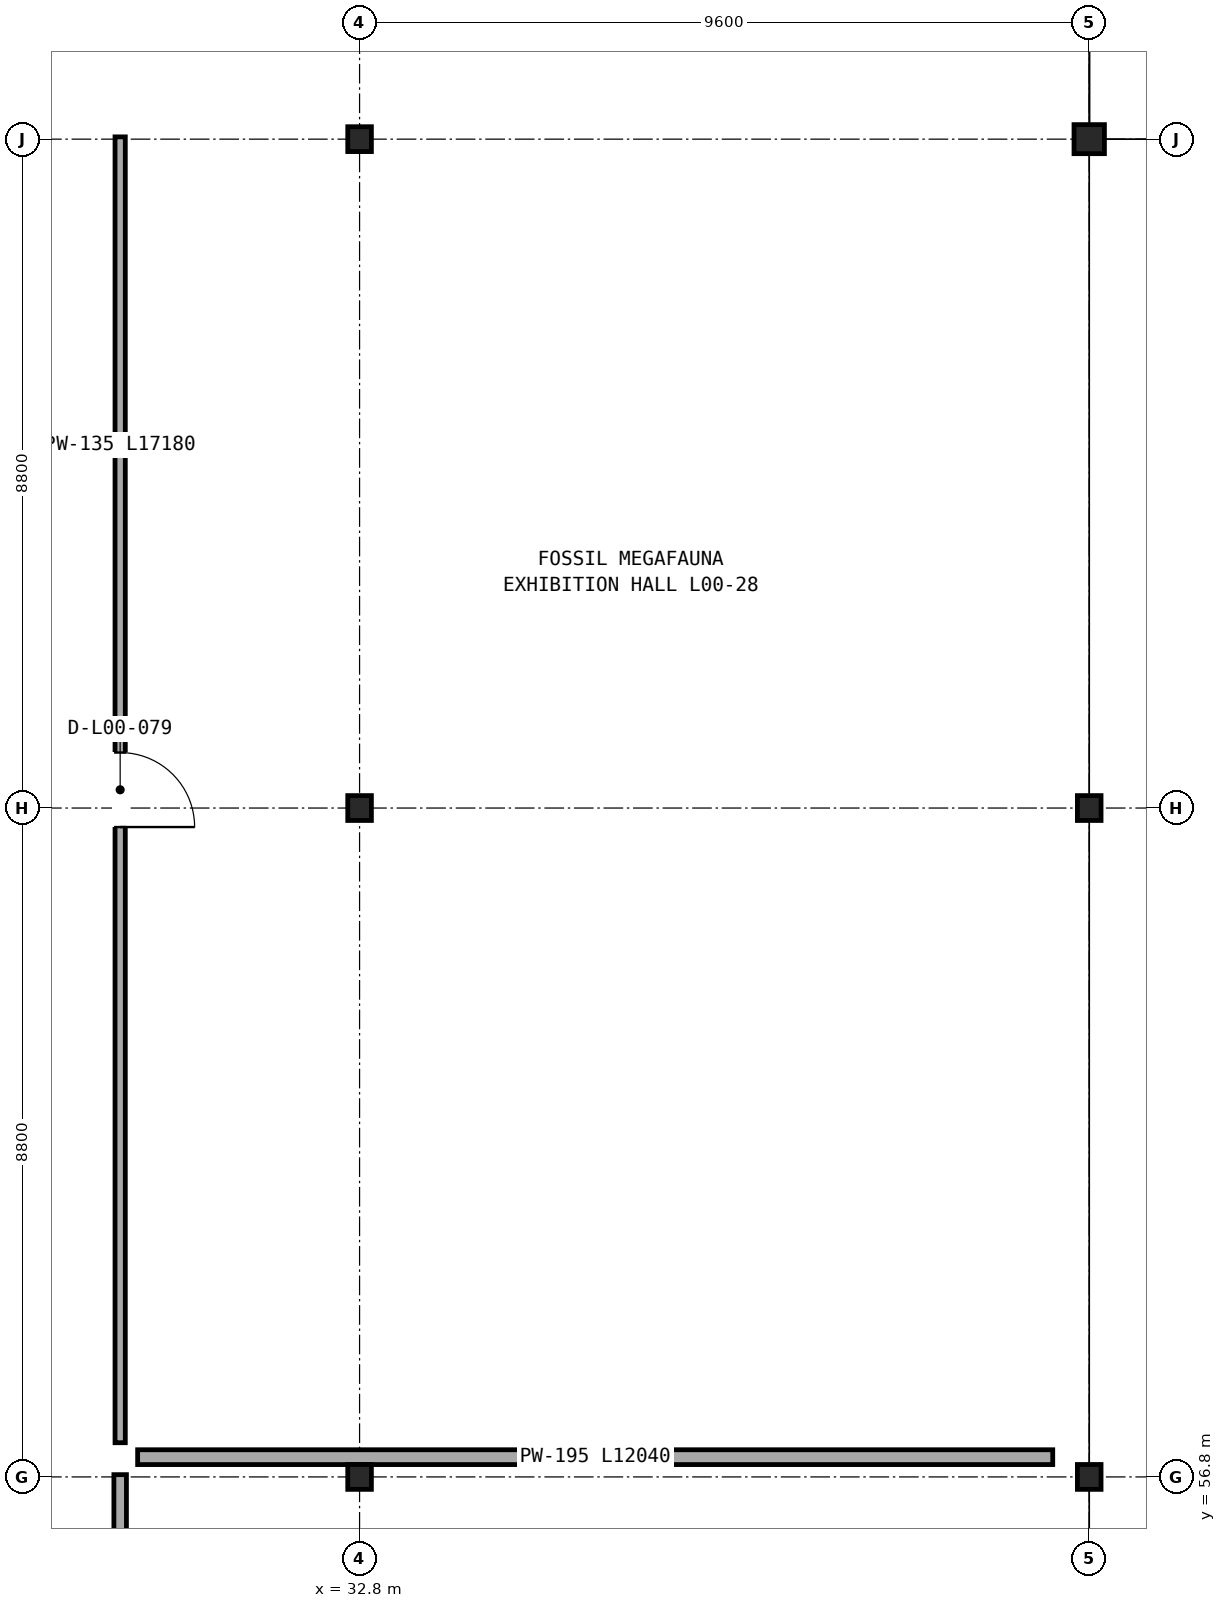
"""IFC4 building model, lengths in metres.
Left out: names, types, materials, properties, quantities, classifications, styles, units other than length and angle.
Written with IfcOpenShell. Run it as: python <this file> out.ifc"""

import sys

from ifc_helpers import new_model, si_unit, direction, frame, frame_2d, origin, origin_2d, place, context, subcontext, project, spatial, rectangle, i_section, extrude, element, fill, save


model = new_model("IFC4")
c1 = context("Model", 3, precision=1e-05, world=origin(), true_north=direction((0.0, 1.0)))
c2 = subcontext(c1, "Body", "Model", "MODEL_VIEW")
j1 = project(units=[si_unit("LENGTHUNIT", "METRE"), si_unit("PLANEANGLEUNIT", "RADIAN")], contexts=[c1])
p1 = place(None, origin())
s1 = spatial("IfcSite", under=j1, at=p1, CompositionType="ELEMENT")
p2 = place(p1, origin())
s2 = spatial("IfcBuilding", under=s1, at=p2, CompositionType="ELEMENT")
p3 = place(p2, origin())
s3 = spatial("IfcBuildingStorey", under=s2, at=p3, CompositionType="ELEMENT", Elevation=0.0)
for number, where, z_axis, x_axis in (
    (1, (32.8, 56.8, 0.0), (0.0, 0.0, 1.0), (1.0, 0.0, 0.0)),
    (2, (32.8, 65.6, 0.0), (0.0, 0.0, 1.0), (1.0, 0.0, 0.0)),
    (3, (32.8, 74.4, 0.0), (0.0, 0.0, 1.0), (1.0, 0.0, 0.0)),
    (4, (42.4, 56.8, 0.0), (0.0, 0.0, 1.0), (1.0, 0.0, 0.0)),
    (5, (42.4, 65.6, 0.0), (0.0, 0.0, 1.0), (1.0, 0.0, 0.0)),
):
    element("IfcColumn", number, at=place(p3, frame(where, z_axis=z_axis, x_axis=x_axis)), inside=s3, PredefinedType="COLUMN", context=c2, shape_type="SweptSolid", body=[
        extrude(i_section(OverallWidth=0.311, OverallDepth=0.327, WebThickness=0.016, FlangeThickness=0.025, FilletRadius=0.017, at=origin_2d()), origin(), (0.0, 0.0, 1.0), 5.6),
    ])
p4 = place(p3, frame((42.4, 74.4, 0.0), z_axis=(0.0, 0.0, 1.0), x_axis=(1.0, 0.0, 0.0)))
e6 = element("IfcColumn", 6, at=p4, inside=s3, PredefinedType="COLUMN", context=c2, shape_type="SweptSolid", body=[
    extrude(i_section(OverallWidth=0.4, OverallDepth=0.382, WebThickness=0.025, FlangeThickness=0.036, at=origin_2d()), origin(), (0.0, 0.0, 1.0), 5.6),
])
p5 = place(p3, frame((29.65, 54.48, 0.0), z_axis=(0.0, 0.0, 1.0), x_axis=(0.0, 1.0, 0.0)))
e7 = element("IfcWall", 7, at=p5, inside=s3, PredefinedType="PARTITIONING", context=c2, shape_type="SweptSolid", body=[
    extrude(rectangle(XDim=2.35, YDim=0.165, at=frame_2d((1.175, 0.0))), origin(), (0.0, 0.0, 1.0), 4.708),
])
p6 = place(p3, frame((29.65, 57.25, 0.0), z_axis=(0.0, 0.0, 1.0), x_axis=(0.0, 1.0, 0.0)))
e8 = element("IfcWall", 8, at=p6, inside=s3, PredefinedType="PARTITIONING", context=c2, shape_type="SweptSolid", body=[
    extrude(rectangle(XDim=17.18, YDim=0.135, at=frame_2d((8.59, 0.0))), origin(), (0.0, 0.0, 1.0), 4.708),
])
p7 = place(p6, frame((8.1, 0.0, 0.0)))
e9 = element("IfcOpeningElement", 9, at=p7, cuts=e8, PredefinedType="OPENING", context=c2, shape_type="SweptSolid", body=[
    extrude(rectangle(XDim=0.98, YDim=2.08, at=frame_2d((0.49, 1.04))), frame((0.0, 0.078, 0.0), z_axis=(0.0, -1.0, 0.0), x_axis=(1.0, 0.0, 0.0)), (0.0, 0.0, 1.0), 0.155),
])
p8 = place(p3, frame((29.88, 57.06, 0.0), z_axis=(0.0, 0.0, 1.0), x_axis=(1.0, 0.0, 0.0)))
e10 = element("IfcWall", 10, at=p8, inside=s3, PredefinedType="PARTITIONING", context=c2, shape_type="SweptSolid", body=[
    extrude(rectangle(XDim=12.04, YDim=0.195, at=frame_2d((6.02, 0.0))), origin(), (0.0, 0.0, 1.0), 4.708),
])
p9 = place(p7, frame((0.98, 0.0, 0.0), z_axis=(0.0, 0.0, 1.0), x_axis=(-1.0, 0.0, 0.0)))
e11 = element("IfcDoor", 11, at=p9, inside=s3, OperationType="SINGLE_SWING_LEFT", PredefinedType="DOOR", context=c2, shape_type="SweptSolid", body=[
    extrude(rectangle(XDim=0.98, YDim=2.08, at=frame_2d((0.49, 1.04))), frame((0.0, 0.025, 0.0), z_axis=(0.0, -1.0, 0.0), x_axis=(1.0, 0.0, 0.0)), (0.0, 0.0, 1.0), 0.05),
])
fill(e9, e11)
save(model, sys.argv[1])
